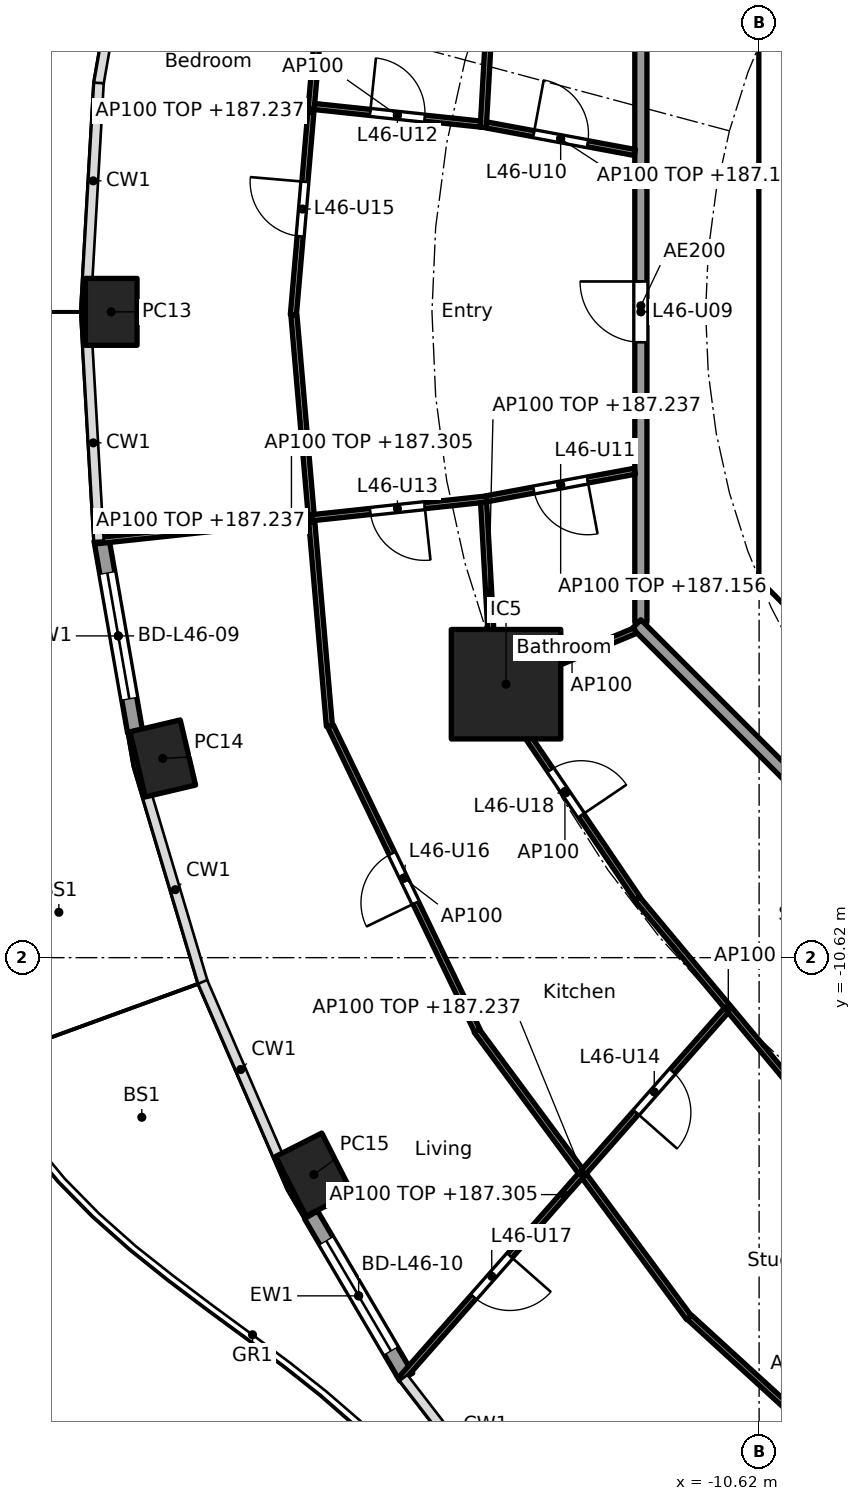
"""IFC4 building model, lengths in metres.
Left out: names, types, materials, properties, quantities, classifications, styles, units other than length and angle.
Written with IfcOpenShell. Run it as: python <this file> out.ifc"""

import sys

from ifc_helpers import new_model, si_unit, direction, frame, frame_2d, origin, origin_2d, place, context, subcontext, project, spatial, polyline, rectangle, hollow_rectangle, outline, extrude, element, fill, save


model = new_model("IFC4")
c1 = context("Model", 3, precision=1e-05, world=origin(), true_north=direction((0.0, 1.0)))
c2 = subcontext(c1, "Body", "Model", "MODEL_VIEW")
j1 = project(units=[si_unit("LENGTHUNIT", "METRE"), si_unit("PLANEANGLEUNIT", "RADIAN")], contexts=[c1])
p1 = place(None, origin())
s1 = spatial("IfcSite", under=j1, at=p1, CompositionType="ELEMENT")
p2 = place(p1, origin())
s2 = spatial("IfcBuilding", under=s1, at=p2, CompositionType="ELEMENT")
p3 = place(p2, frame((0.0, 0.0, 184.4)))
s3 = spatial("IfcBuildingStorey", under=s2, at=p3, CompositionType="ELEMENT", Elevation=184.4)
for number, where, z_axis, x_axis in (
    (1, (-21.275, 0.0, 0.0), (0.0, 0.0, 1.0), (0.0, -1.0, 0.0)),
    (2, (-20.427, -7.344, 0.0), (0.0, 0.0, 1.0), (0.229, -0.973, 0.0)),
    (3, (-17.942, -14.188, 0.0), (0.0, 0.0, 1.0), (0.452, -0.892, 0.0)),
):
    element("IfcColumn", number, at=place(p3, frame(where, z_axis=z_axis, x_axis=x_axis)), inside=s3, PredefinedType="COLUMN", context=c2, shape_type="SweptSolid", body=[
        extrude(hollow_rectangle(XDim=1.1, YDim=0.85, WallThickness=0.036, at=origin_2d()), origin(), (0.0, 0.0, 1.0), 3.7),
    ])
p4 = place(p3, frame((-14.782, -6.123, 0.0), z_axis=(0.0, 0.0, 1.0), x_axis=(1.0, 0.0, 0.0)))
e4 = element("IfcColumn", 4, at=p4, inside=s3, PredefinedType="COLUMN", context=c2, shape_type="SweptSolid", body=[
    extrude(rectangle(XDim=1.8, YDim=1.8, at=origin_2d()), origin(), (0.0, 0.0, 1.0), 3.7),
])
p5 = place(p3, frame((-20.882, -6.91, 0.0), z_axis=(0.0, 0.0, 1.0), x_axis=(-0.172223552479, 0.98505789067, 0.0)))
e5 = element("IfcWall", 5, at=p5, inside=s3, PredefinedType="SOLIDWALL", context=c2, shape_type="SweptSolid", body=[
    extrude(rectangle(XDim=3.211, YDim=0.25, at=frame_2d((1.605, 0.0))), origin(), (0.0, 0.0, 1.0), 3.44),
])
p6 = place(p5, frame((0.555, 0.0, 0.0)))
e6 = element("IfcOpeningElement", 6, at=p6, cuts=e5, PredefinedType="OPENING", context=c2, shape_type="SweptSolid", body=[
    extrude(rectangle(XDim=2.1, YDim=2.4, at=frame_2d((1.05, 1.2))), frame((0.0, 0.135, 0.0), z_axis=(0.0, -1.0, 0.0), x_axis=(1.0, 0.0, 0.0)), (0.0, 0.0, 1.0), 0.27),
])
p7 = place(p3, frame((-16.424, -17.515, 0.0), z_axis=(0.0, 0.0, 1.0), x_axis=(-0.506309086483, 0.862352079458, 0.0)))
e7 = element("IfcWall", 7, at=p7, inside=s3, PredefinedType="SOLIDWALL", context=c2, shape_type="SweptSolid", body=[
    extrude(rectangle(XDim=3.092, YDim=0.25, at=frame_2d((1.546, 0.0))), origin(), (0.0, 0.0, 1.0), 3.44),
])
p8 = place(p7, frame((0.496, 0.0, 0.0)))
e8 = element("IfcOpeningElement", 8, at=p8, cuts=e7, PredefinedType="OPENING", context=c2, shape_type="SweptSolid", body=[
    extrude(rectangle(XDim=2.1, YDim=2.4, at=frame_2d((1.05, 1.2))), frame((0.0, 0.135, 0.0), z_axis=(0.0, -1.0, 0.0), x_axis=(1.0, 0.0, 0.0)), (0.0, 0.0, 1.0), 0.27),
])
p9 = place(p3, frame((-10.325, 3.801, 0.0), z_axis=(0.0, 0.0, 1.0), x_axis=(0.0, -1.0, 0.0)))
e9 = element("IfcWall", 9, at=p9, inside=s3, PredefinedType="SHEAR", context=c2, shape_type="SweptSolid", body=[
    extrude(rectangle(XDim=7.602, YDim=0.6, at=frame_2d((3.801, 0.0))), origin(), (0.0, 0.0, 1.0), 3.44),
])
p10 = place(p9, frame((0.651, 0.0, 0.0)))
e10 = element("IfcOpeningElement", 10, at=p10, cuts=e9, PredefinedType="OPENING", context=c2, shape_type="SweptSolid", body=[
    extrude(rectangle(XDim=1.5, YDim=2.1, at=frame_2d((0.75, 1.05))), frame((0.0, 0.31, 0.0), z_axis=(0.0, -1.0, 0.0), x_axis=(1.0, 0.0, 0.0)), (0.0, 0.0, 1.0), 0.62),
])
p11 = place(p9, frame((5.451, 0.0, 0.0)))
e11 = element("IfcOpeningElement", 11, at=p11, cuts=e9, PredefinedType="OPENING", context=c2, shape_type="SweptSolid", body=[
    extrude(rectangle(XDim=1.5, YDim=2.1, at=frame_2d((0.75, 1.05))), frame((0.0, 0.31, 0.0), z_axis=(0.0, -1.0, 0.0), x_axis=(1.0, 0.0, 0.0)), (0.0, 0.0, 1.0), 0.62),
])
p12 = place(p3, origin())
e12 = element("IfcWall", 12, at=p12, inside=s3, PredefinedType="SHEAR", context=c2, shape_type="SweptSolid", body=[
    extrude(outline(polyline([(-10.625, -3.801), (-10.025, -3.801), (-10.025, -4.152), (-9.776, -4.401), (-10.2, -4.825), (-10.625, -4.401), (-10.625, -3.801)])), origin(), (0.0, 0.0, 1.0), 3.44),
])
p13 = place(p3, origin())
e13 = element("IfcWall", 13, at=p13, inside=s3, PredefinedType="SHEAR", context=c2, shape_type="SweptSolid", body=[
    extrude(outline(polyline([(-10.2, 4.825), (-9.776, 4.401), (-10.025, 4.152), (-10.025, 3.801), (-10.625, 3.801), (-10.625, 4.401), (-10.2, 4.825)])), origin(), (0.0, 0.0, 1.0), 3.44),
])
p14 = place(p3, frame((-12.565, 5.304, 0.0), z_axis=(0.0, 0.0, 1.0), x_axis=(0.0, -1.0, 0.0)))
e14 = element("IfcWall", 14, at=p14, inside=s3, PredefinedType="PARTITIONING", context=c2, shape_type="SweptSolid", body=[
    extrude(rectangle(XDim=10.409, YDim=0.2, at=frame_2d((5.205, 0.0))), origin(), (0.0, 0.0, 1.0), 3.44),
])
p15 = place(p14, frame((4.804, 0.0, 0.0)))
e15 = element("IfcOpeningElement", 15, at=p15, cuts=e14, PredefinedType="OPENING", context=c2, shape_type="SweptSolid", body=[
    extrude(rectangle(XDim=1.0, YDim=2.1, at=frame_2d((0.5, 1.05))), frame((0.0, 0.11, 0.0), z_axis=(0.0, -1.0, 0.0), x_axis=(1.0, 0.0, 0.0)), (0.0, 0.0, 1.0), 0.22),
])
p16 = place(p3, frame((-12.635, -5.134, 0.0), z_axis=(0.0, 0.0, 1.0), x_axis=(0.707106781187, -0.707106781187, 0.0)))
e16 = element("IfcWall", 16, at=p16, inside=s3, PredefinedType="PARTITIONING", context=c2, shape_type="SweptSolid", body=[
    extrude(rectangle(XDim=10.609, YDim=0.2, at=frame_2d((5.305, 0.0))), origin(), (0.0, 0.0, 1.0), 3.44),
])
p17 = place(p3, frame((-14.986, 6.067, 0.0), z_axis=(0.0, 0.0, 1.0), x_axis=(-0.056333452925, -0.998412010185, 0.0)))
e17 = element("IfcWall", 17, at=p17, inside=s3, PredefinedType="PARTITIONING", context=c2, shape_type="SweptSolid", body=[
    extrude(rectangle(XDim=3.038, YDim=0.1, at=frame_2d((1.519, 0.0))), origin(), (0.0, 0.0, 1.0), 2.837),
])
p18 = place(p3, frame((-17.7, 6.664, 0.0), z_axis=(0.0, 0.0, 1.0), x_axis=(-0.086004282666, -0.996294767307, 0.0)))
e18 = element("IfcWall", 18, at=p18, inside=s3, PredefinedType="PARTITIONING", context=c2, shape_type="SweptSolid", body=[
    extrude(rectangle(XDim=6.739, YDim=0.1, at=frame_2d((3.37, 0.0))), origin(), (0.0, 0.0, 1.0), 2.837),
])
p19 = place(p18, frame((4.542, 0.0, 0.0)))
e19 = element("IfcOpeningElement", 19, at=p19, cuts=e18, PredefinedType="OPENING", context=c2, shape_type="SweptSolid", body=[
    extrude(rectangle(XDim=0.9, YDim=2.1, at=frame_2d((0.45, 1.05))), frame((0.0, 0.06, 0.0), z_axis=(0.0, -1.0, 0.0), x_axis=(1.0, 0.0, 0.0)), (0.0, 0.0, 1.0), 0.12),
])
p20 = place(p3, frame((-12.663, 2.621, 0.0), z_axis=(0.0, 0.0, 1.0), x_axis=(-0.983176884312, 0.182655999505, 0.0)))
e20 = element("IfcWall", 20, at=p20, inside=s3, PredefinedType="PARTITIONING", context=c2, shape_type="SweptSolid", body=[
    extrude(rectangle(XDim=2.483, YDim=0.1, at=frame_2d((1.242, 0.0))), origin(), (0.0, 0.0, 1.0), 2.756),
])
p21 = place(p20, frame((0.792, 0.0, 0.0)))
e21 = element("IfcOpeningElement", 21, at=p21, cuts=e20, PredefinedType="OPENING", context=c2, shape_type="SweptSolid", body=[
    extrude(rectangle(XDim=0.9, YDim=2.1, at=frame_2d((0.45, 1.05))), frame((0.0, 0.06, 0.0), z_axis=(0.0, -1.0, 0.0), x_axis=(1.0, 0.0, 0.0)), (0.0, 0.0, 1.0), 0.12),
])
p22 = place(p3, frame((-15.204, 3.089, 0.0), z_axis=(0.0, 0.0, 1.0), x_axis=(-0.994477149695, 0.104953316934, 0.0)))
e22 = element("IfcWall", 22, at=p22, inside=s3, PredefinedType="PARTITIONING", context=c2, shape_type="SweptSolid", body=[
    extrude(rectangle(XDim=2.745, YDim=0.1, at=frame_2d((1.373, 0.0))), origin(), (0.0, 0.0, 1.0), 3.44),
])
p23 = place(p22, frame((0.922, 0.0, 0.0)))
e23 = element("IfcOpeningElement", 23, at=p23, cuts=e22, PredefinedType="OPENING", context=c2, shape_type="SweptSolid", body=[
    extrude(rectangle(XDim=0.9, YDim=2.1, at=frame_2d((0.45, 1.05))), frame((0.0, 0.06, 0.0), z_axis=(0.0, -1.0, 0.0), x_axis=(1.0, 0.0, 0.0)), (0.0, 0.0, 1.0), 0.12),
])
p24 = place(p3, frame((-18.271, -0.05, 0.0), z_axis=(0.0, 0.0, 1.0), x_axis=(0.086018199227, -0.996293565874, 0.0)))
e24 = element("IfcWall", 24, at=p24, inside=s3, PredefinedType="PARTITIONING", context=c2, shape_type="SweptSolid", body=[
    extrude(rectangle(XDim=6.789, YDim=0.1, at=frame_2d((3.395, 0.0))), origin(), (0.0, 0.0, 1.0), 2.837),
])
p25 = place(p3, frame((-12.663, -2.621, 0.0), z_axis=(0.0, 0.0, 1.0), x_axis=(-0.983176884312, -0.182655999505, 0.0)))
e25 = element("IfcWall", 25, at=p25, inside=s3, PredefinedType="PARTITIONING", context=c2, shape_type="SweptSolid", body=[
    extrude(rectangle(XDim=2.483, YDim=0.1, at=frame_2d((1.242, 0.0))), origin(), (0.0, 0.0, 1.0), 2.756),
])
p26 = place(p25, frame((0.792, 0.0, 0.0)))
e26 = element("IfcOpeningElement", 26, at=p26, cuts=e25, PredefinedType="OPENING", context=c2, shape_type="SweptSolid", body=[
    extrude(rectangle(XDim=0.9, YDim=2.1, at=frame_2d((0.45, 1.05))), frame((0.0, 0.06, 0.0), z_axis=(0.0, -1.0, 0.0), x_axis=(1.0, 0.0, 0.0)), (0.0, 0.0, 1.0), 0.12),
])
p27 = place(p3, frame((-15.104, -3.078, 0.0), z_axis=(0.0, 0.0, 1.0), x_axis=(-0.994316167803, -0.106467640365, 0.0)))
e27 = element("IfcWall", 27, at=p27, inside=s3, PredefinedType="PARTITIONING", context=c2, shape_type="SweptSolid", body=[
    extrude(rectangle(XDim=6.45, YDim=0.1, at=frame_2d((3.225, 0.0))), origin(), (0.0, 0.0, 1.0), 2.905),
])
p28 = place(p27, frame((1.022, 0.0, 0.0)))
e28 = element("IfcOpeningElement", 28, at=p28, cuts=e27, PredefinedType="OPENING", context=c2, shape_type="SweptSolid", body=[
    extrude(rectangle(XDim=0.9, YDim=2.1, at=frame_2d((0.45, 1.05))), frame((0.0, 0.06, 0.0), z_axis=(0.0, -1.0, 0.0), x_axis=(1.0, 0.0, 0.0)), (0.0, 0.0, 1.0), 0.12),
])
p29 = place(p3, frame((-15.151, -3.133, 0.0), z_axis=(0.0, 0.0, 1.0), x_axis=(0.05637501378, -0.998409664327, 0.0)))
e29 = element("IfcWall", 29, at=p29, inside=s3, PredefinedType="PARTITIONING", context=c2, shape_type="SweptSolid", body=[
    extrude(rectangle(XDim=2.988, YDim=0.1, at=frame_2d((1.494, 0.0))), origin(), (0.0, 0.0, 1.0), 2.837),
])
p30 = place(p3, frame((-12.657, -5.243, 0.0), z_axis=(0.0, 0.0, 1.0), x_axis=(-0.923864733477, -0.382719158442, 0.0)))
e30 = element("IfcWall", 30, at=p30, inside=s3, PredefinedType="PARTITIONING", context=c2, shape_type="SweptSolid", body=[
    extrude(rectangle(XDim=2.25, YDim=0.1, at=frame_2d((1.125, 0.0))), origin(), (0.0, 0.0, 1.0), 3.44),
])
p31 = place(p3, frame((-15.008, -6.125, 0.0), z_axis=(0.0, 0.0, 1.0), x_axis=(0.561073758086, -0.827765811076, 0.0)))
e31 = element("IfcWall", 31, at=p31, inside=s3, PredefinedType="PARTITIONING", context=c2, shape_type="SweptSolid", body=[
    extrude(rectangle(XDim=4.259, YDim=0.1, at=frame_2d((2.129, 0.0))), origin(), (0.0, 0.0, 1.0), 3.44),
])
p32 = place(p31, frame((1.704, 0.0, 0.0)))
e32 = element("IfcOpeningElement", 32, at=p32, cuts=e31, PredefinedType="OPENING", context=c2, shape_type="SweptSolid", body=[
    extrude(rectangle(XDim=0.9, YDim=2.1, at=frame_2d((0.45, 1.05))), frame((0.0, 0.06, 0.0), z_axis=(0.0, -1.0, 0.0), x_axis=(1.0, 0.0, 0.0)), (0.0, 0.0, 1.0), 0.12),
])
p33 = place(p3, frame((-17.669, -6.809, 0.0), z_axis=(0.0, 0.0, 1.0), x_axis=(0.434040130629, -0.900893536997, 0.0)))
e33 = element("IfcWall", 33, at=p33, inside=s3, PredefinedType="PARTITIONING", context=c2, shape_type="SweptSolid", body=[
    extrude(rectangle(XDim=5.558, YDim=0.1, at=frame_2d((2.779, 0.0))), origin(), (0.0, 0.0, 1.0), 3.44),
])
p34 = place(p33, frame((2.329, 0.0, 0.0)))
e34 = element("IfcOpeningElement", 34, at=p34, cuts=e33, PredefinedType="OPENING", context=c2, shape_type="SweptSolid", body=[
    extrude(rectangle(XDim=0.9, YDim=2.1, at=frame_2d((0.45, 1.05))), frame((0.0, 0.06, 0.0), z_axis=(0.0, -1.0, 0.0), x_axis=(1.0, 0.0, 0.0)), (0.0, 0.0, 1.0), 0.12),
])
p35 = place(p3, frame((-12.623, -9.653, 0.0), z_axis=(0.0, 0.0, 1.0), x_axis=(0.640297481347, -0.768127030758, 0.0)))
e35 = element("IfcWall", 35, at=p35, inside=s3, PredefinedType="PARTITIONING", context=c2, shape_type="SweptSolid", body=[
    extrude(rectangle(XDim=4.672, YDim=0.1, at=frame_2d((2.336, 0.0))), origin(), (0.0, 0.0, 1.0), 2.837),
])
p36 = place(p3, frame((-15.265, -11.821, 0.0), z_axis=(0.0, 0.0, 1.0), x_axis=(0.594711348772, -0.803939308432, 0.0)))
e36 = element("IfcWall", 36, at=p36, inside=s3, PredefinedType="PARTITIONING", context=c2, shape_type="SweptSolid", body=[
    extrude(rectangle(XDim=5.872, YDim=0.1, at=frame_2d((2.936, 0.0))), origin(), (0.0, 0.0, 1.0), 2.837),
])
p37 = place(p3, frame((-11.16, -11.485, 0.0), z_axis=(0.0, 0.0, 1.0), x_axis=(-0.661275898802, -0.750142776852, 0.0)))
e37 = element("IfcWall", 37, at=p37, inside=s3, PredefinedType="PARTITIONING", context=c2, shape_type="SweptSolid", body=[
    extrude(rectangle(XDim=8.083, YDim=0.1, at=frame_2d((4.041, 0.0))), origin(), (0.0, 0.0, 1.0), 2.905),
])
p38 = place(p37, frame((1.341, 0.0, 0.0)))
e38 = element("IfcOpeningElement", 38, at=p38, cuts=e37, PredefinedType="OPENING", context=c2, shape_type="SweptSolid", body=[
    extrude(rectangle(XDim=0.9, YDim=2.1, at=frame_2d((0.45, 1.05))), frame((0.0, 0.06, 0.0), z_axis=(0.0, -1.0, 0.0), x_axis=(1.0, 0.0, 0.0)), (0.0, 0.0, 1.0), 0.12),
])
p39 = place(p37, frame((5.382, 0.0, 0.0)))
e39 = element("IfcOpeningElement", 39, at=p39, cuts=e37, PredefinedType="OPENING", context=c2, shape_type="SweptSolid", body=[
    extrude(rectangle(XDim=0.9, YDim=2.1, at=frame_2d((0.45, 1.05))), frame((0.0, 0.06, 0.0), z_axis=(0.0, -1.0, 0.0), x_axis=(1.0, 0.0, 0.0)), (0.0, 0.0, 1.0), 0.12),
])
p40 = place(p3, frame((-11.766, -16.535, 0.0), z_axis=(0.0, 0.0, 1.0), x_axis=(0.73807320557, -0.674720640872, 0.0)))
e40 = element("IfcWall", 40, at=p40, inside=s3, PredefinedType="PARTITIONING", context=c2, shape_type="SweptSolid", body=[
    extrude(rectangle(XDim=5.399, YDim=0.1, at=frame_2d((2.699, 0.0))), origin(), (0.0, 0.0, 1.0), 2.837),
])
p41 = place(p6, origin())
e41 = element("IfcDoor", 41, at=p41, inside=s3, OperationType="SLIDING_TO_LEFT", PredefinedType="DOOR", context=c2, shape_type="SweptSolid", body=[
    extrude(rectangle(XDim=2.1, YDim=2.4, at=frame_2d((1.05, 1.2))), frame((0.0, 0.025, 0.0), z_axis=(0.0, -1.0, 0.0), x_axis=(1.0, 0.0, 0.0)), (0.0, 0.0, 1.0), 0.05),
])
fill(e6, e41)
p42 = place(p8, origin())
e42 = element("IfcDoor", 42, at=p42, inside=s3, OperationType="SLIDING_TO_LEFT", PredefinedType="DOOR", context=c2, shape_type="SweptSolid", body=[
    extrude(rectangle(XDim=2.1, YDim=2.4, at=frame_2d((1.05, 1.2))), frame((0.0, 0.025, 0.0), z_axis=(0.0, -1.0, 0.0), x_axis=(1.0, 0.0, 0.0)), (0.0, 0.0, 1.0), 0.05),
])
fill(e8, e42)
p43 = place(p10, origin())
e43 = element("IfcDoor", 43, at=p43, inside=s3, OperationType="DOUBLE_DOOR_SINGLE_SWING", PredefinedType="DOOR", context=c2, shape_type="SweptSolid", body=[
    extrude(rectangle(XDim=1.5, YDim=2.1, at=frame_2d((0.75, 1.05))), frame((0.0, 0.025, 0.0), z_axis=(0.0, -1.0, 0.0), x_axis=(1.0, 0.0, 0.0)), (0.0, 0.0, 1.0), 0.05),
])
fill(e10, e43)
p44 = place(p11, origin())
e44 = element("IfcDoor", 44, at=p44, inside=s3, OperationType="DOUBLE_DOOR_SINGLE_SWING", PredefinedType="DOOR", context=c2, shape_type="SweptSolid", body=[
    extrude(rectangle(XDim=1.5, YDim=2.1, at=frame_2d((0.75, 1.05))), frame((0.0, 0.025, 0.0), z_axis=(0.0, -1.0, 0.0), x_axis=(1.0, 0.0, 0.0)), (0.0, 0.0, 1.0), 0.05),
])
fill(e11, e44)
p45 = place(p15, frame((1.0, 0.0, 0.0), x_axis=(-1.0, 0.0, 0.0)))
e45 = element("IfcDoor", 45, at=p45, inside=s3, OperationType="SINGLE_SWING_RIGHT", PredefinedType="DOOR", context=c2, shape_type="SweptSolid", body=[
    extrude(rectangle(XDim=1.0, YDim=2.1, at=frame_2d((0.5, 1.05))), frame((0.0, 0.025, 0.0), z_axis=(0.0, -1.0, 0.0), x_axis=(1.0, 0.0, 0.0)), (0.0, 0.0, 1.0), 0.05),
])
fill(e15, e45)
p46 = place(p21, frame((0.9, 0.0, 0.0), x_axis=(-1.0, 0.0, 0.0)))
e46 = element("IfcDoor", 46, at=p46, inside=s3, OperationType="SINGLE_SWING_LEFT", PredefinedType="DOOR", context=c2, shape_type="SweptSolid", body=[
    extrude(rectangle(XDim=0.9, YDim=2.1, at=frame_2d((0.45, 1.05))), frame((0.0, 0.025, 0.0), z_axis=(0.0, -1.0, 0.0), x_axis=(1.0, 0.0, 0.0)), (0.0, 0.0, 1.0), 0.05),
])
fill(e21, e46)
p47 = place(p26, origin())
e47 = element("IfcDoor", 47, at=p47, inside=s3, OperationType="SINGLE_SWING_LEFT", PredefinedType="DOOR", context=c2, shape_type="SweptSolid", body=[
    extrude(rectangle(XDim=0.9, YDim=2.1, at=frame_2d((0.45, 1.05))), frame((0.0, 0.025, 0.0), z_axis=(0.0, -1.0, 0.0), x_axis=(1.0, 0.0, 0.0)), (0.0, 0.0, 1.0), 0.05),
])
fill(e26, e47)
p48 = place(p23, frame((0.9, 0.0, 0.0), x_axis=(-1.0, 0.0, 0.0)))
e48 = element("IfcDoor", 48, at=p48, inside=s3, OperationType="SINGLE_SWING_LEFT", PredefinedType="DOOR", context=c2, shape_type="SweptSolid", body=[
    extrude(rectangle(XDim=0.9, YDim=2.1, at=frame_2d((0.45, 1.05))), frame((0.0, 0.025, 0.0), z_axis=(0.0, -1.0, 0.0), x_axis=(1.0, 0.0, 0.0)), (0.0, 0.0, 1.0), 0.05),
])
fill(e23, e48)
p49 = place(p28, origin())
e49 = element("IfcDoor", 49, at=p49, inside=s3, OperationType="SINGLE_SWING_LEFT", PredefinedType="DOOR", context=c2, shape_type="SweptSolid", body=[
    extrude(rectangle(XDim=0.9, YDim=2.1, at=frame_2d((0.45, 1.05))), frame((0.0, 0.025, 0.0), z_axis=(0.0, -1.0, 0.0), x_axis=(1.0, 0.0, 0.0)), (0.0, 0.0, 1.0), 0.05),
])
fill(e28, e49)
p50 = place(p38, origin())
e50 = element("IfcDoor", 50, at=p50, inside=s3, OperationType="SINGLE_SWING_RIGHT", PredefinedType="DOOR", context=c2, shape_type="SweptSolid", body=[
    extrude(rectangle(XDim=0.9, YDim=2.1, at=frame_2d((0.45, 1.05))), frame((0.0, 0.025, 0.0), z_axis=(0.0, -1.0, 0.0), x_axis=(1.0, 0.0, 0.0)), (0.0, 0.0, 1.0), 0.05),
])
fill(e38, e50)
p51 = place(p19, frame((0.9, 0.0, 0.0), x_axis=(-1.0, 0.0, 0.0)))
e51 = element("IfcDoor", 51, at=p51, inside=s3, OperationType="SINGLE_SWING_RIGHT", PredefinedType="DOOR", context=c2, shape_type="SweptSolid", body=[
    extrude(rectangle(XDim=0.9, YDim=2.1, at=frame_2d((0.45, 1.05))), frame((0.0, 0.025, 0.0), z_axis=(0.0, -1.0, 0.0), x_axis=(1.0, 0.0, 0.0)), (0.0, 0.0, 1.0), 0.05),
])
fill(e19, e51)
p52 = place(p34, frame((0.9, 0.0, 0.0), x_axis=(-1.0, 0.0, 0.0)))
e52 = element("IfcDoor", 52, at=p52, inside=s3, OperationType="SINGLE_SWING_LEFT", PredefinedType="DOOR", context=c2, shape_type="SweptSolid", body=[
    extrude(rectangle(XDim=0.9, YDim=2.1, at=frame_2d((0.45, 1.05))), frame((0.0, 0.025, 0.0), z_axis=(0.0, -1.0, 0.0), x_axis=(1.0, 0.0, 0.0)), (0.0, 0.0, 1.0), 0.05),
])
fill(e34, e52)
p53 = place(p39, origin())
e53 = element("IfcDoor", 53, at=p53, inside=s3, OperationType="SINGLE_SWING_LEFT", PredefinedType="DOOR", context=c2, shape_type="SweptSolid", body=[
    extrude(rectangle(XDim=0.9, YDim=2.1, at=frame_2d((0.45, 1.05))), frame((0.0, 0.025, 0.0), z_axis=(0.0, -1.0, 0.0), x_axis=(1.0, 0.0, 0.0)), (0.0, 0.0, 1.0), 0.05),
])
fill(e39, e53)
p54 = place(p32, origin())
e54 = element("IfcDoor", 54, at=p54, inside=s3, OperationType="SINGLE_SWING_RIGHT", PredefinedType="DOOR", context=c2, shape_type="SweptSolid", body=[
    extrude(rectangle(XDim=0.9, YDim=2.1, at=frame_2d((0.45, 1.05))), frame((0.0, 0.025, 0.0), z_axis=(0.0, -1.0, 0.0), x_axis=(1.0, 0.0, 0.0)), (0.0, 0.0, 1.0), 0.05),
])
fill(e32, e54)
save(model, sys.argv[1])
